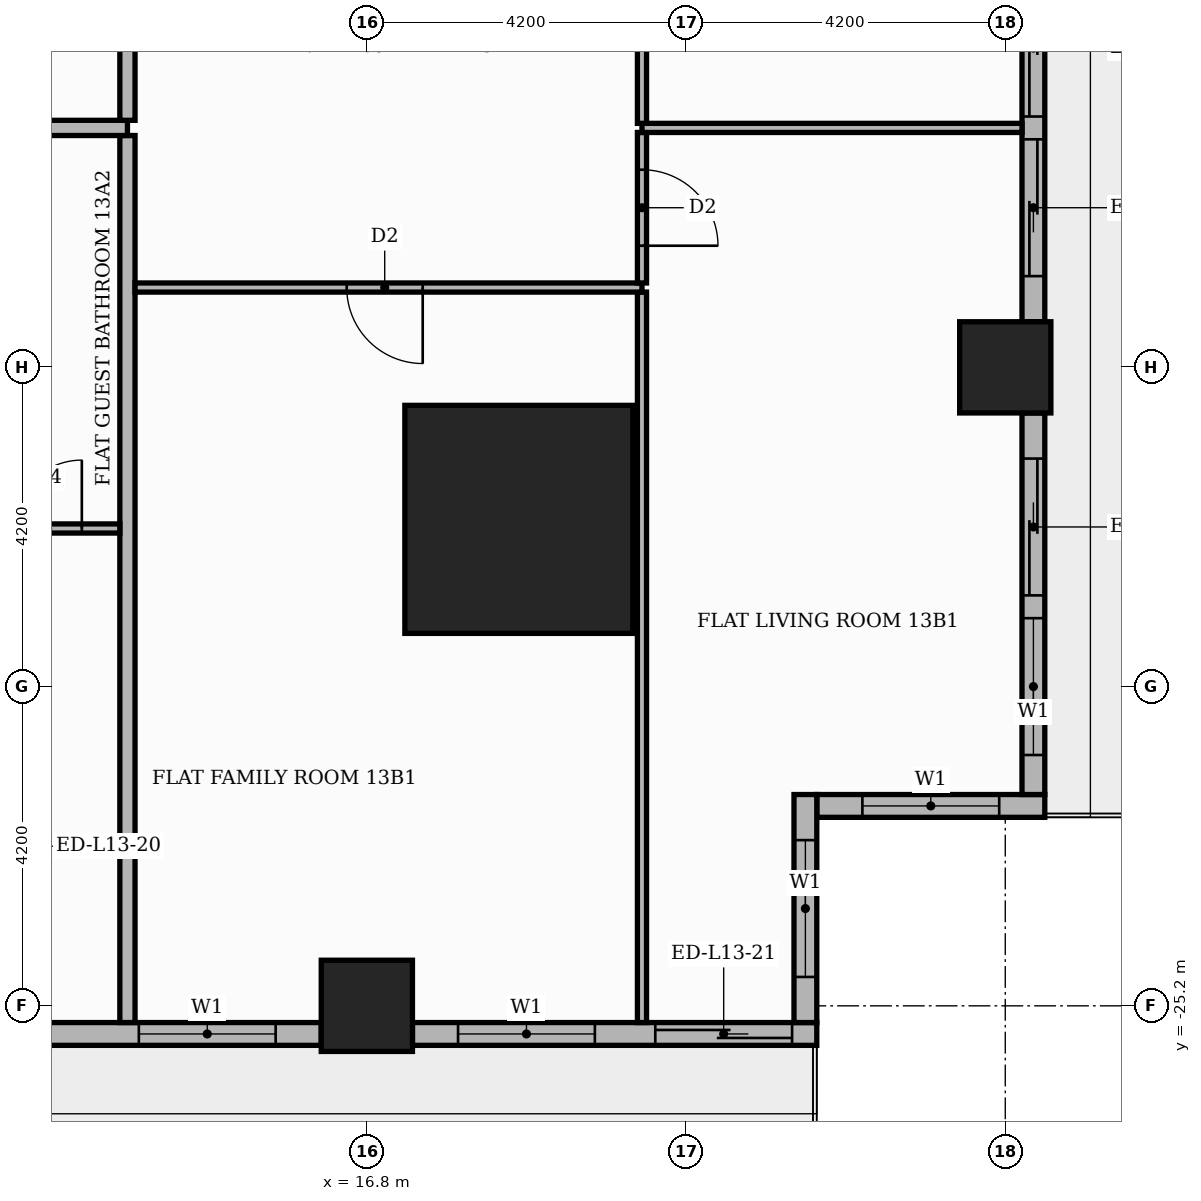
"""IFC4 building model, lengths in metres.
Left out: names, types, materials, properties, quantities, classifications, styles, units other than length and angle.
Written with IfcOpenShell. Run it as: python <this file> out.ifc"""

import sys

from ifc_helpers import new_model, si_unit, direction, frame, frame_2d, origin, origin_2d, place, context, subcontext, project, spatial, rectangle, extrude, element, fill, save


model = new_model("IFC4")
c1 = context("Model", 3, precision=1e-05, world=origin(), true_north=direction((0.0, 1.0)))
c2 = subcontext(c1, "Body", "Model", "MODEL_VIEW")
j1 = project(units=[si_unit("LENGTHUNIT", "METRE"), si_unit("PLANEANGLEUNIT", "RADIAN")], contexts=[c1])
p1 = place(None, origin())
s1 = spatial("IfcSite", under=j1, at=p1, CompositionType="ELEMENT")
p2 = place(p1, origin())
s2 = spatial("IfcBuilding", under=s1, at=p2, CompositionType="ELEMENT")
p3 = place(p2, frame((0.0, 0.0, 58.2)))
s3 = spatial("IfcBuildingStorey", under=s2, at=p3, CompositionType="ELEMENT", Elevation=58.2)
p4 = place(p3, frame((18.8, -18.8, 0.0), z_axis=(0.0, 0.0, 1.0), x_axis=(1.0, 0.0, 0.0)))
e1 = element("IfcColumn", 1, at=p4, inside=s3, PredefinedType="COLUMN", context=c2, shape_type="SweptSolid", body=[
    extrude(rectangle(XDim=3.0, YDim=3.0, at=origin_2d()), origin(), (0.0, 0.0, 1.0), 3.9),
])
for number, where, z_axis, x_axis in (
    (2, (25.2, -16.8, 0.0), (0.0, 0.0, 1.0), (1.0, 0.0, 0.0)),
    (3, (16.8, -25.2, 0.0), (0.0, 0.0, 1.0), (1.0, 0.0, 0.0)),
):
    element("IfcColumn", number, at=place(p3, frame(where, z_axis=z_axis, x_axis=x_axis)), inside=s3, PredefinedType="COLUMN", context=c2, shape_type="SweptSolid", body=[
        extrude(rectangle(XDim=1.2, YDim=1.2, at=origin_2d()), origin(), (0.0, 0.0, 1.0), 3.9),
    ])
p5 = place(p3, frame((22.72, -22.57, 0.0), z_axis=(0.0, 0.0, 1.0), x_axis=(1.0, 0.0, 0.0)))
e4 = element("IfcWall", 4, at=p5, inside=s3, PredefinedType="STANDARD", context=c2, shape_type="SweptSolid", body=[
    extrude(rectangle(XDim=3.0, YDim=0.3, at=frame_2d((1.5, 0.0))), origin(), (0.0, 0.0, 1.0), 3.48),
])
p6 = place(p5, frame((0.6, 0.0, 0.9)))
e5 = element("IfcOpeningElement", 5, at=p6, cuts=e4, PredefinedType="OPENING", context=c2, shape_type="SweptSolid", body=[
    extrude(rectangle(XDim=1.8, YDim=2.1, at=frame_2d((0.9, 1.05))), frame((0.0, 0.16, 0.0), z_axis=(0.0, -1.0, 0.0), x_axis=(1.0, 0.0, 0.0)), (0.0, 0.0, 1.0), 0.32),
])
p7 = place(p3, frame((25.57, -22.42, 0.0), z_axis=(0.0, 0.0, 1.0), x_axis=(0.0, 1.0, 0.0)))
e6 = element("IfcWall", 6, at=p7, inside=s3, PredefinedType="STANDARD", context=c2, shape_type="SweptSolid", body=[
    extrude(rectangle(XDim=5.02, YDim=0.3, at=frame_2d((2.51, 0.0))), origin(), (0.0, 0.0, 1.0), 3.48),
])
p8 = place(p7, frame((0.52, 0.0, 0.9)))
e7 = element("IfcOpeningElement", 7, at=p8, cuts=e6, PredefinedType="OPENING", context=c2, shape_type="SweptSolid", body=[
    extrude(rectangle(XDim=1.8, YDim=2.1, at=frame_2d((0.9, 1.05))), frame((0.0, 0.16, 0.0), z_axis=(0.0, -1.0, 0.0), x_axis=(1.0, 0.0, 0.0)), (0.0, 0.0, 1.0), 0.32),
])
p9 = place(p7, frame((2.62, 0.0, 0.0)))
e8 = element("IfcOpeningElement", 8, at=p9, cuts=e6, PredefinedType="OPENING", context=c2, shape_type="SweptSolid", body=[
    extrude(rectangle(XDim=1.8, YDim=2.4, at=frame_2d((0.9, 1.2))), frame((0.0, 0.16, 0.0), z_axis=(0.0, -1.0, 0.0), x_axis=(1.0, 0.0, 0.0)), (0.0, 0.0, 1.0), 0.32),
])
p10 = place(p3, frame((25.57, -16.2, 0.0), z_axis=(0.0, 0.0, 1.0), x_axis=(0.0, 1.0, 0.0)))
e9 = element("IfcWall", 9, at=p10, inside=s3, PredefinedType="STANDARD", context=c2, shape_type="SweptSolid", body=[
    extrude(rectangle(XDim=7.2, YDim=0.3, at=frame_2d((3.6, 0.0))), origin(), (0.0, 0.0, 1.0), 3.48),
])
p11 = place(p10, frame((0.6, 0.0, 0.0)))
e10 = element("IfcOpeningElement", 10, at=p11, cuts=e9, PredefinedType="OPENING", context=c2, shape_type="SweptSolid", body=[
    extrude(rectangle(XDim=1.8, YDim=2.4, at=frame_2d((0.9, 1.2))), frame((0.0, 0.16, 0.0), z_axis=(0.0, -1.0, 0.0), x_axis=(1.0, 0.0, 0.0)), (0.0, 0.0, 1.0), 0.32),
])
p12 = place(p10, frame((2.7, 0.0, 0.0)))
e11 = element("IfcOpeningElement", 11, at=p12, cuts=e9, PredefinedType="OPENING", context=c2, shape_type="SweptSolid", body=[
    extrude(rectangle(XDim=1.8, YDim=2.4, at=frame_2d((0.9, 1.2))), frame((0.0, 0.16, 0.0), z_axis=(0.0, -1.0, 0.0), x_axis=(1.0, 0.0, 0.0)), (0.0, 0.0, 1.0), 0.32),
])
p13 = place(p10, frame((4.8, 0.0, 0.9)))
e12 = element("IfcOpeningElement", 12, at=p13, cuts=e9, PredefinedType="OPENING", context=c2, shape_type="SweptSolid", body=[
    extrude(rectangle(XDim=1.8, YDim=2.1, at=frame_2d((0.9, 1.05))), frame((0.0, 0.16, 0.0), z_axis=(0.0, -1.0, 0.0), x_axis=(1.0, 0.0, 0.0)), (0.0, 0.0, 1.0), 0.32),
])
p14 = place(p3, frame((11.85, -25.57, 0.0), z_axis=(0.0, 0.0, 1.0), x_axis=(1.0, 0.0, 0.0)))
e13 = element("IfcWall", 13, at=p14, inside=s3, PredefinedType="STANDARD", context=c2, shape_type="SweptSolid", body=[
    extrude(rectangle(XDim=4.35, YDim=0.3, at=frame_2d((2.175, 0.0))), origin(), (0.0, 0.0, 1.0), 3.48),
])
p15 = place(p14, frame((1.95, 0.0, 0.9)))
e14 = element("IfcOpeningElement", 14, at=p15, cuts=e13, PredefinedType="OPENING", context=c2, shape_type="SweptSolid", body=[
    extrude(rectangle(XDim=1.8, YDim=2.1, at=frame_2d((0.9, 1.05))), frame((0.0, 0.16, 0.0), z_axis=(0.0, -1.0, 0.0), x_axis=(1.0, 0.0, 0.0)), (0.0, 0.0, 1.0), 0.32),
])
p16 = place(p3, frame((17.4, -25.57, 0.0), z_axis=(0.0, 0.0, 1.0), x_axis=(1.0, 0.0, 0.0)))
e15 = element("IfcWall", 15, at=p16, inside=s3, PredefinedType="STANDARD", context=c2, shape_type="SweptSolid", body=[
    extrude(rectangle(XDim=5.32, YDim=0.3, at=frame_2d((2.66, 0.0))), origin(), (0.0, 0.0, 1.0), 3.48),
])
p17 = place(p16, frame((0.6, 0.0, 0.9)))
e16 = element("IfcOpeningElement", 16, at=p17, cuts=e15, PredefinedType="OPENING", context=c2, shape_type="SweptSolid", body=[
    extrude(rectangle(XDim=1.8, YDim=2.1, at=frame_2d((0.9, 1.05))), frame((0.0, 0.16, 0.0), z_axis=(0.0, -1.0, 0.0), x_axis=(1.0, 0.0, 0.0)), (0.0, 0.0, 1.0), 0.32),
])
p18 = place(p16, frame((3.195, 0.0, 0.0)))
e17 = element("IfcOpeningElement", 17, at=p18, cuts=e15, PredefinedType="OPENING", context=c2, shape_type="SweptSolid", body=[
    extrude(rectangle(XDim=1.8, YDim=2.4, at=frame_2d((0.9, 1.2))), frame((0.0, 0.16, 0.0), z_axis=(0.0, -1.0, 0.0), x_axis=(1.0, 0.0, 0.0)), (0.0, 0.0, 1.0), 0.32),
])
p19 = place(p3, frame((22.57, -25.42, 0.0), z_axis=(0.0, 0.0, 1.0), x_axis=(0.0, 1.0, 0.0)))
e18 = element("IfcWall", 18, at=p19, inside=s3, PredefinedType="STANDARD", context=c2, shape_type="SweptSolid", body=[
    extrude(rectangle(XDim=3.0, YDim=0.3, at=frame_2d((1.5, 0.0))), origin(), (0.0, 0.0, 1.0), 3.48),
])
p20 = place(p19, frame((0.6, 0.0, 0.9)))
e19 = element("IfcOpeningElement", 19, at=p20, cuts=e18, PredefinedType="OPENING", context=c2, shape_type="SweptSolid", body=[
    extrude(rectangle(XDim=1.8, YDim=2.1, at=frame_2d((0.9, 1.05))), frame((0.0, 0.16, 0.0), z_axis=(0.0, -1.0, 0.0), x_axis=(1.0, 0.0, 0.0)), (0.0, 0.0, 1.0), 0.32),
])
p21 = place(p3, frame((13.65, -25.42, 0.0), z_axis=(0.0, 0.0, 1.0), x_axis=(0.0, 1.0, 0.0)))
e20 = element("IfcWall", 20, at=p21, inside=s3, PredefinedType="PARTITIONING", context=c2, shape_type="SweptSolid", body=[
    extrude(rectangle(XDim=11.67, YDim=0.2, at=frame_2d((5.835, 0.0))), origin(), (0.0, 0.0, 1.0), 3.48),
])
p22 = place(p3, frame((20.42, -25.42, 0.0), z_axis=(0.0, 0.0, 1.0), x_axis=(0.0, 1.0, 0.0)))
e21 = element("IfcWall", 21, at=p22, inside=s3, PredefinedType="PARTITIONING", context=c2, shape_type="SweptSolid", body=[
    extrude(rectangle(XDim=9.61, YDim=0.12, at=frame_2d((4.805, 0.0))), origin(), (0.0, 0.0, 1.0), 3.48),
])
p23 = place(p3, frame((3.15, -18.92, 0.0), z_axis=(0.0, 0.0, 1.0), x_axis=(1.0, 0.0, 0.0)))
e22 = element("IfcWall", 22, at=p23, inside=s3, PredefinedType="PARTITIONING", context=c2, shape_type="SweptSolid", body=[
    extrude(rectangle(XDim=10.4, YDim=0.12, at=frame_2d((5.2, 0.0))), origin(), (0.0, 0.0, 1.0), 3.48),
])
p24 = place(p23, frame((2.7, 0.0, 0.0)))
e23 = element("IfcOpeningElement", 23, at=p24, cuts=e22, PredefinedType="OPENING", context=c2, shape_type="SweptSolid", body=[
    extrude(rectangle(XDim=0.9, YDim=2.1, at=frame_2d((0.45, 1.05))), frame((0.0, 0.07, 0.0), z_axis=(0.0, -1.0, 0.0), x_axis=(1.0, 0.0, 0.0)), (0.0, 0.0, 1.0), 0.14),
])
p25 = place(p23, frame((6.85, 0.0, 0.0)))
e24 = element("IfcOpeningElement", 24, at=p25, cuts=e22, PredefinedType="OPENING", context=c2, shape_type="SweptSolid", body=[
    extrude(rectangle(XDim=1.0, YDim=2.1, at=frame_2d((0.5, 1.05))), frame((0.0, 0.07, 0.0), z_axis=(0.0, -1.0, 0.0), x_axis=(1.0, 0.0, 0.0)), (0.0, 0.0, 1.0), 0.14),
])
p26 = place(p23, frame((9.0, 0.0, 0.0)))
e25 = element("IfcOpeningElement", 25, at=p26, cuts=e22, PredefinedType="OPENING", context=c2, shape_type="SweptSolid", body=[
    extrude(rectangle(XDim=0.9, YDim=2.1, at=frame_2d((0.45, 1.05))), frame((0.0, 0.07, 0.0), z_axis=(0.0, -1.0, 0.0), x_axis=(1.0, 0.0, 0.0)), (0.0, 0.0, 1.0), 0.14),
])
p27 = place(p3, frame((13.75, -15.75, 0.0), z_axis=(0.0, 0.0, 1.0), x_axis=(1.0, 0.0, 0.0)))
e26 = element("IfcWall", 26, at=p27, inside=s3, PredefinedType="PARTITIONING", context=c2, shape_type="SweptSolid", body=[
    extrude(rectangle(XDim=6.67, YDim=0.12, at=frame_2d((3.335, 0.0))), origin(), (0.0, 0.0, 1.0), 3.48),
])
p28 = place(p27, frame((2.785, 0.0, 0.0)))
e27 = element("IfcOpeningElement", 27, at=p28, cuts=e26, PredefinedType="OPENING", context=c2, shape_type="SweptSolid", body=[
    extrude(rectangle(XDim=1.0, YDim=2.1, at=frame_2d((0.5, 1.05))), frame((0.0, 0.07, 0.0), z_axis=(0.0, -1.0, 0.0), x_axis=(1.0, 0.0, 0.0)), (0.0, 0.0, 1.0), 0.14),
])
p29 = place(p3, frame((20.42, -15.69, 0.0), z_axis=(0.0, 0.0, 1.0), x_axis=(0.0, 1.0, 0.0)))
e28 = element("IfcWall", 28, at=p29, inside=s3, PredefinedType="PARTITIONING", context=c2, shape_type="SweptSolid", body=[
    extrude(rectangle(XDim=1.98, YDim=0.12, at=frame_2d((0.99, 0.0))), origin(), (0.0, 0.0, 1.0), 3.48),
])
p30 = place(p29, frame((0.49, 0.0, 0.0)))
e29 = element("IfcOpeningElement", 29, at=p30, cuts=e28, PredefinedType="OPENING", context=c2, shape_type="SweptSolid", body=[
    extrude(rectangle(XDim=1.0, YDim=2.1, at=frame_2d((0.5, 1.05))), frame((0.0, 0.07, 0.0), z_axis=(0.0, -1.0, 0.0), x_axis=(1.0, 0.0, 0.0)), (0.0, 0.0, 1.0), 0.14),
])
p31 = place(p3, frame((-25.42, -13.65, 0.0), z_axis=(0.0, 0.0, 1.0), x_axis=(1.0, 0.0, 0.0)))
e30 = element("IfcWall", 30, at=p31, inside=s3, PredefinedType="PARTITIONING", context=c2, shape_type="SweptSolid", body=[
    extrude(rectangle(XDim=39.07, YDim=0.2, at=frame_2d((19.535, 0.0))), origin(), (0.0, 0.0, 1.0), 3.48),
])
p32 = place(p31, frame((13.32, 0.0, 0.0)))
e31 = element("IfcOpeningElement", 31, at=p32, cuts=e30, PredefinedType="OPENING", context=c2, shape_type="SweptSolid", body=[
    extrude(rectangle(XDim=1.1, YDim=2.4, at=frame_2d((0.55, 1.2))), frame((0.0, 0.11, 0.0), z_axis=(0.0, -1.0, 0.0), x_axis=(1.0, 0.0, 0.0)), (0.0, 0.0, 1.0), 0.22),
])
p33 = place(p31, frame((25.92, 0.0, 0.0)))
e32 = element("IfcOpeningElement", 32, at=p33, cuts=e30, PredefinedType="OPENING", context=c2, shape_type="SweptSolid", body=[
    extrude(rectangle(XDim=1.1, YDim=2.4, at=frame_2d((0.55, 1.2))), frame((0.0, 0.11, 0.0), z_axis=(0.0, -1.0, 0.0), x_axis=(1.0, 0.0, 0.0)), (0.0, 0.0, 1.0), 0.22),
])
p34 = place(p3, frame((20.42, -13.65, 0.0), z_axis=(0.0, 0.0, 1.0), x_axis=(1.0, 0.0, 0.0)))
e33 = element("IfcWall", 33, at=p34, inside=s3, PredefinedType="PARTITIONING", context=c2, shape_type="SweptSolid", body=[
    extrude(rectangle(XDim=5.0, YDim=0.12, at=frame_2d((2.5, 0.0))), origin(), (0.0, 0.0, 1.0), 3.48),
])
p35 = place(p3, frame((20.42, -13.59, 0.0), z_axis=(0.0, 0.0, 1.0), x_axis=(0.0, 1.0, 0.0)))
e34 = element("IfcWall", 34, at=p35, inside=s3, PredefinedType="PARTITIONING", context=c2, shape_type="SweptSolid", body=[
    extrude(rectangle(XDim=4.08, YDim=0.12, at=frame_2d((2.04, 0.0))), origin(), (0.0, 0.0, 1.0), 3.48),
])
p36 = place(p35, frame((1.59, 0.0, 0.0)))
e35 = element("IfcOpeningElement", 35, at=p36, cuts=e34, PredefinedType="OPENING", context=c2, shape_type="SweptSolid", body=[
    extrude(rectangle(XDim=0.9, YDim=2.1, at=frame_2d((0.45, 1.05))), frame((0.0, 0.07, 0.0), z_axis=(0.0, -1.0, 0.0), x_axis=(1.0, 0.0, 0.0)), (0.0, 0.0, 1.0), 0.14),
])
p37 = place(p3, frame((13.65, -13.55, 0.0), z_axis=(0.0, 0.0, 1.0), x_axis=(0.0, 1.0, 0.0)))
e36 = element("IfcWall", 36, at=p37, inside=s3, PredefinedType="PARTITIONING", context=c2, shape_type="SweptSolid", body=[
    extrude(rectangle(XDim=27.1, YDim=0.2, at=frame_2d((13.55, 0.0))), origin(), (0.0, 0.0, 1.0), 3.48),
])
p38 = place(p37, frame((1.45, 0.0, 0.0)))
e37 = element("IfcOpeningElement", 37, at=p38, cuts=e36, PredefinedType="OPENING", context=c2, shape_type="SweptSolid", body=[
    extrude(rectangle(XDim=1.1, YDim=2.4, at=frame_2d((0.55, 1.2))), frame((0.0, 0.11, 0.0), z_axis=(0.0, -1.0, 0.0), x_axis=(1.0, 0.0, 0.0)), (0.0, 0.0, 1.0), 0.22),
])
p39 = place(p6, origin())
e38 = element("IfcWindow", 38, at=p39, inside=s3, PartitioningType="SINGLE_PANEL", PredefinedType="WINDOW", context=c2, shape_type="SweptSolid", body=[
    extrude(rectangle(XDim=1.8, YDim=2.1, at=frame_2d((0.9, 1.05))), frame((0.0, 0.03, 0.0), z_axis=(0.0, -1.0, 0.0), x_axis=(1.0, 0.0, 0.0)), (0.0, 0.0, 1.0), 0.06),
])
fill(e5, e38)
p40 = place(p8, origin())
e39 = element("IfcWindow", 39, at=p40, inside=s3, PartitioningType="SINGLE_PANEL", PredefinedType="WINDOW", context=c2, shape_type="SweptSolid", body=[
    extrude(rectangle(XDim=1.8, YDim=2.1, at=frame_2d((0.9, 1.05))), frame((0.0, 0.03, 0.0), z_axis=(0.0, -1.0, 0.0), x_axis=(1.0, 0.0, 0.0)), (0.0, 0.0, 1.0), 0.06),
])
fill(e7, e39)
p41 = place(p9, origin())
e40 = element("IfcDoor", 40, at=p41, inside=s3, OperationType="SLIDING_TO_RIGHT", PredefinedType="DOOR", context=c2, shape_type="SweptSolid", body=[
    extrude(rectangle(XDim=1.8, YDim=2.4, at=frame_2d((0.9, 1.2))), frame((0.0, 0.025, 0.0), z_axis=(0.0, -1.0, 0.0), x_axis=(1.0, 0.0, 0.0)), (0.0, 0.0, 1.0), 0.05),
])
fill(e8, e40)
p42 = place(p11, origin())
e41 = element("IfcDoor", 41, at=p42, inside=s3, OperationType="SLIDING_TO_LEFT", PredefinedType="DOOR", context=c2, shape_type="SweptSolid", body=[
    extrude(rectangle(XDim=1.8, YDim=2.4, at=frame_2d((0.9, 1.2))), frame((0.0, 0.025, 0.0), z_axis=(0.0, -1.0, 0.0), x_axis=(1.0, 0.0, 0.0)), (0.0, 0.0, 1.0), 0.05),
])
fill(e10, e41)
p43 = place(p12, origin())
e42 = element("IfcDoor", 42, at=p43, inside=s3, OperationType="SLIDING_TO_RIGHT", PredefinedType="DOOR", context=c2, shape_type="SweptSolid", body=[
    extrude(rectangle(XDim=1.8, YDim=2.4, at=frame_2d((0.9, 1.2))), frame((0.0, 0.025, 0.0), z_axis=(0.0, -1.0, 0.0), x_axis=(1.0, 0.0, 0.0)), (0.0, 0.0, 1.0), 0.05),
])
fill(e11, e42)
p44 = place(p15, origin())
e43 = element("IfcWindow", 43, at=p44, inside=s3, PartitioningType="SINGLE_PANEL", PredefinedType="WINDOW", context=c2, shape_type="SweptSolid", body=[
    extrude(rectangle(XDim=1.8, YDim=2.1, at=frame_2d((0.9, 1.05))), frame((0.0, 0.03, 0.0), z_axis=(0.0, -1.0, 0.0), x_axis=(1.0, 0.0, 0.0)), (0.0, 0.0, 1.0), 0.06),
])
fill(e14, e43)
p45 = place(p17, origin())
e44 = element("IfcWindow", 44, at=p45, inside=s3, PartitioningType="SINGLE_PANEL", PredefinedType="WINDOW", context=c2, shape_type="SweptSolid", body=[
    extrude(rectangle(XDim=1.8, YDim=2.1, at=frame_2d((0.9, 1.05))), frame((0.0, 0.03, 0.0), z_axis=(0.0, -1.0, 0.0), x_axis=(1.0, 0.0, 0.0)), (0.0, 0.0, 1.0), 0.06),
])
fill(e16, e44)
p46 = place(p18, origin())
e45 = element("IfcDoor", 45, at=p46, inside=s3, OperationType="SLIDING_TO_RIGHT", PredefinedType="DOOR", context=c2, shape_type="SweptSolid", body=[
    extrude(rectangle(XDim=1.8, YDim=2.4, at=frame_2d((0.9, 1.2))), frame((0.0, 0.025, 0.0), z_axis=(0.0, -1.0, 0.0), x_axis=(1.0, 0.0, 0.0)), (0.0, 0.0, 1.0), 0.05),
])
fill(e17, e45)
p47 = place(p20, origin())
e46 = element("IfcWindow", 46, at=p47, inside=s3, PartitioningType="SINGLE_PANEL", PredefinedType="WINDOW", context=c2, shape_type="SweptSolid", body=[
    extrude(rectangle(XDim=1.8, YDim=2.1, at=frame_2d((0.9, 1.05))), frame((0.0, 0.03, 0.0), z_axis=(0.0, -1.0, 0.0), x_axis=(1.0, 0.0, 0.0)), (0.0, 0.0, 1.0), 0.06),
])
fill(e19, e46)
p48 = place(p26, origin())
e47 = element("IfcDoor", 47, at=p48, inside=s3, OperationType="SINGLE_SWING_RIGHT", PredefinedType="DOOR", context=c2, shape_type="SweptSolid", body=[
    extrude(rectangle(XDim=0.9, YDim=2.1, at=frame_2d((0.45, 1.05))), frame((0.0, 0.025, 0.0), z_axis=(0.0, -1.0, 0.0), x_axis=(1.0, 0.0, 0.0)), (0.0, 0.0, 1.0), 0.05),
])
fill(e25, e47)
p49 = place(p28, frame((1.0, 0.0, 0.0), z_axis=(0.0, 0.0, 1.0), x_axis=(-1.0, 0.0, 0.0)))
e48 = element("IfcDoor", 48, at=p49, inside=s3, OperationType="SINGLE_SWING_RIGHT", PredefinedType="DOOR", context=c2, shape_type="SweptSolid", body=[
    extrude(rectangle(XDim=1.0, YDim=2.1, at=frame_2d((0.5, 1.05))), frame((0.0, 0.025, 0.0), z_axis=(0.0, -1.0, 0.0), x_axis=(1.0, 0.0, 0.0)), (0.0, 0.0, 1.0), 0.05),
])
fill(e27, e48)
p50 = place(p30, frame((1.0, 0.0, 0.0), z_axis=(0.0, 0.0, 1.0), x_axis=(-1.0, 0.0, 0.0)))
e49 = element("IfcDoor", 49, at=p50, inside=s3, OperationType="SINGLE_SWING_LEFT", PredefinedType="DOOR", context=c2, shape_type="SweptSolid", body=[
    extrude(rectangle(XDim=1.0, YDim=2.1, at=frame_2d((0.5, 1.05))), frame((0.0, 0.025, 0.0), z_axis=(0.0, -1.0, 0.0), x_axis=(1.0, 0.0, 0.0)), (0.0, 0.0, 1.0), 0.05),
])
fill(e29, e49)
save(model, sys.argv[1])
